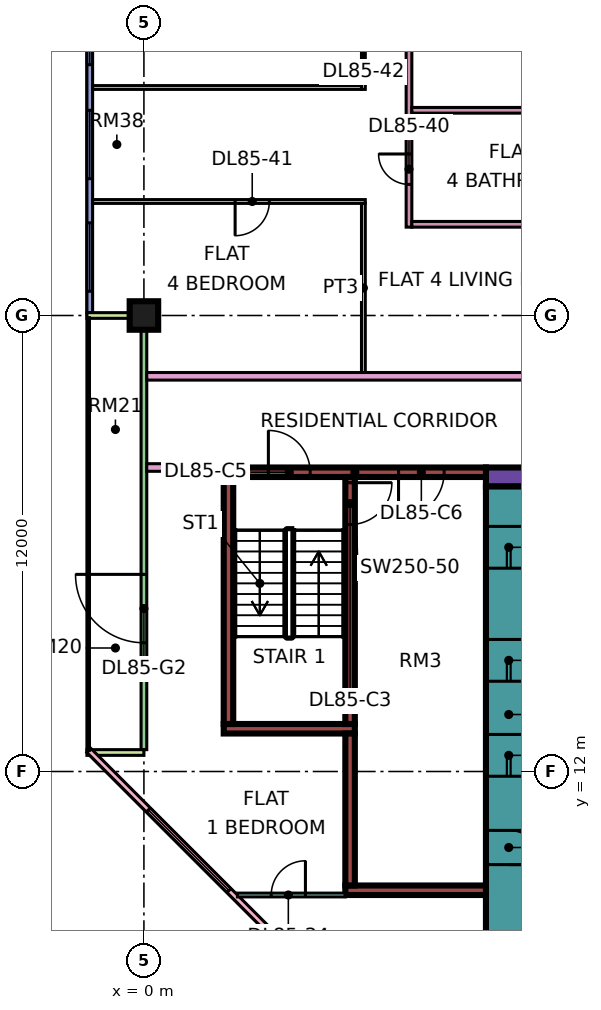
"""IFC4 building model, lengths in metres.
Left out: names, types, materials, properties, quantities, classifications, styles, units other than length and angle.
Written with IfcOpenShell. Run it as: python <this file> out.ifc"""

import sys

from ifc_helpers import new_model, si_unit, direction, frame, frame_2d, origin, origin_2d, place, context, subcontext, project, spatial, rectangle, extrude, element, fill, save


model = new_model("IFC4")
c1 = context("Model", 3, precision=1e-05, world=origin(), true_north=direction((0.0, 1.0)))
c2 = subcontext(c1, "Body", "Model", "MODEL_VIEW")
j1 = project(units=[si_unit("LENGTHUNIT", "METRE"), si_unit("PLANEANGLEUNIT", "RADIAN")], contexts=[c1])
p1 = place(None, origin())
s1 = spatial("IfcSite", under=j1, at=p1, CompositionType="ELEMENT")
p2 = place(p1, origin())
s2 = spatial("IfcBuilding", under=s1, at=p2, CompositionType="ELEMENT")
p3 = place(p2, frame((0.0, 0.0, 365.15)))
s3 = spatial("IfcBuildingStorey", under=s2, at=p3, CompositionType="ELEMENT", Elevation=365.15)
p4 = place(p3, frame((0.0, 24.0, 0.0), z_axis=(0.0, 0.0, 1.0), x_axis=(1.0, 0.0, 0.0)))
e1 = element("IfcColumn", 1, at=p4, inside=s3, PredefinedType="COLUMN", context=c2, shape_type="SweptSolid", body=[
    extrude(rectangle(XDim=0.75, YDim=0.75, at=origin_2d()), origin(), (0.0, 0.0, 1.0), 3.75),
])
p5 = place(p3, frame((9.0, 19.75, 0.0), z_axis=(0.0, 0.0, 1.0), x_axis=(1.0, 0.0, 0.0)))
e2 = element("IfcWall", 2, at=p5, inside=s3, PredefinedType="SHEAR", context=c2, shape_type="SweptSolid", body=[
    extrude(rectangle(XDim=25.0, YDim=0.5, at=frame_2d((12.5, 0.0))), origin(), (0.0, 0.0, 1.0), 3.75),
])
p6 = place(p5, frame((19.1, 0.0, 0.0)))
e3 = element("IfcOpeningElement", 3, at=p6, cuts=e2, PredefinedType="OPENING", context=c2, shape_type="SweptSolid", body=[
    extrude(rectangle(XDim=1.8, YDim=2.4, at=frame_2d((0.9, 1.2))), frame((0.0, 0.26, 0.0), z_axis=(0.0, -1.0, 0.0), x_axis=(1.0, 0.0, 0.0)), (0.0, 0.0, 1.0), 0.52),
])
p7 = place(p3, frame((9.6, 7.5, 0.0), z_axis=(0.0, 0.0, 1.0), x_axis=(0.0, 1.0, 0.0)))
e4 = element("IfcWall", 4, at=p7, inside=s3, PredefinedType="SHEAR", context=c2, shape_type="SweptSolid", body=[
    extrude(rectangle(XDim=12.0, YDim=1.2, at=frame_2d((6.0, 0.0))), origin(), (0.0, 0.0, 1.0), 3.75),
])
p8 = place(p7, frame((4.375, 0.0, 0.0)))
e5 = element("IfcOpeningElement", 5, at=p8, cuts=e4, PredefinedType="OPENING", context=c2, shape_type="SweptSolid", body=[
    extrude(rectangle(XDim=1.1, YDim=2.2, at=frame_2d((0.55, 1.1))), frame((0.0, 0.61, 0.0), z_axis=(0.0, -1.0, 0.0), x_axis=(1.0, 0.0, 0.0)), (0.0, 0.0, 1.0), 1.22),
])
p9 = place(p7, frame((6.875, 0.0, 0.0)))
e6 = element("IfcOpeningElement", 6, at=p9, cuts=e4, PredefinedType="OPENING", context=c2, shape_type="SweptSolid", body=[
    extrude(rectangle(XDim=1.1, YDim=2.2, at=frame_2d((0.55, 1.1))), frame((0.0, 0.61, 0.0), z_axis=(0.0, -1.0, 0.0), x_axis=(1.0, 0.0, 0.0)), (0.0, 0.0, 1.0), 1.22),
])
p10 = place(p7, frame((9.85, 0.0, 0.0)))
e7 = element("IfcOpeningElement", 7, at=p10, cuts=e4, PredefinedType="OPENING", context=c2, shape_type="SweptSolid", body=[
    extrude(rectangle(XDim=1.1, YDim=2.2, at=frame_2d((0.55, 1.1))), frame((0.0, 0.61, 0.0), z_axis=(0.0, -1.0, 0.0), x_axis=(1.0, 0.0, 0.0)), (0.0, 0.0, 1.0), 1.22),
])
p11 = place(p7, frame((2.05, 0.0, 0.0)))
e8 = element("IfcOpeningElement", 8, at=p11, cuts=e4, PredefinedType="OPENING", context=c2, shape_type="SweptSolid", body=[
    extrude(rectangle(XDim=0.9, YDim=2.1, at=frame_2d((0.45, 1.05))), frame((0.0, 0.61, 0.0), z_axis=(0.0, -1.0, 0.0), x_axis=(1.0, 0.0, 0.0)), (0.0, 0.0, 1.0), 1.22),
])
p12 = place(p3, frame((2.1, 19.875, 0.0), z_axis=(0.0, 0.0, 1.0), x_axis=(1.0, 0.0, 0.0)))
e9 = element("IfcWall", 9, at=p12, inside=s3, PredefinedType="SHEAR", context=c2, shape_type="SweptSolid", body=[
    extrude(rectangle(XDim=6.9, YDim=0.25, at=frame_2d((3.45, 0.0))), origin(), (0.0, 0.0, 1.0), 3.75),
])
p13 = place(p12, frame((1.175, 0.0, 0.0)))
e10 = element("IfcOpeningElement", 10, at=p13, cuts=e9, PredefinedType="OPENING", context=c2, shape_type="SweptSolid", body=[
    extrude(rectangle(XDim=1.1, YDim=2.2, at=frame_2d((0.55, 1.1))), frame((0.0, 0.135, 0.0), z_axis=(0.0, -1.0, 0.0), x_axis=(1.0, 0.0, 0.0)), (0.0, 0.0, 1.0), 0.27),
])
p14 = place(p12, frame((4.6, 0.0, 0.0)))
e11 = element("IfcOpeningElement", 11, at=p14, cuts=e9, PredefinedType="OPENING", context=c2, shape_type="SweptSolid", body=[
    extrude(rectangle(XDim=1.2, YDim=2.2, at=frame_2d((0.6, 1.1))), frame((0.0, 0.135, 0.0), z_axis=(0.0, -1.0, 0.0), x_axis=(1.0, 0.0, 0.0)), (0.0, 0.0, 1.0), 0.27),
])
p15 = place(p3, frame((2.1, 13.125, 0.0), z_axis=(0.0, 0.0, 1.0), x_axis=(1.0, 0.0, 0.0)))
e12 = element("IfcWall", 12, at=p15, inside=s3, PredefinedType="SHEAR", context=c2, shape_type="SweptSolid", body=[
    extrude(rectangle(XDim=3.45, YDim=0.25, at=frame_2d((1.725, 0.0))), origin(), (0.0, 0.0, 1.0), 3.75),
])
p16 = place(p3, frame((2.225, 13.25, 0.0), z_axis=(0.0, 0.0, 1.0), x_axis=(0.0, 1.0, 0.0)))
e13 = element("IfcWall", 13, at=p16, inside=s3, PredefinedType="SHEAR", context=c2, shape_type="SweptSolid", body=[
    extrude(rectangle(XDim=6.5, YDim=0.25, at=frame_2d((3.25, 0.0))), origin(), (0.0, 0.0, 1.0), 3.75),
])
p17 = place(p3, frame((5.425, 13.25, 0.0), z_axis=(0.0, 0.0, 1.0), x_axis=(0.0, 1.0, 0.0)))
e14 = element("IfcWall", 14, at=p17, inside=s3, PredefinedType="SHEAR", context=c2, shape_type="SweptSolid", body=[
    extrude(rectangle(XDim=6.5, YDim=0.25, at=frame_2d((3.25, 0.0))), origin(), (0.0, 0.0, 1.0), 3.75),
])
p18 = place(p17, frame((5.25, 0.0, 0.0)))
e15 = element("IfcOpeningElement", 15, at=p18, cuts=e14, PredefinedType="OPENING", context=c2, shape_type="SweptSolid", body=[
    extrude(rectangle(XDim=1.1, YDim=2.2, at=frame_2d((0.55, 1.1))), frame((0.0, 0.135, 0.0), z_axis=(0.0, -1.0, 0.0), x_axis=(1.0, 0.0, 0.0)), (0.0, 0.0, 1.0), 0.27),
])
p19 = place(p3, frame((5.3, 8.875, 0.0), z_axis=(0.0, 0.0, 1.0), x_axis=(1.0, 0.0, 0.0)))
e16 = element("IfcWall", 16, at=p19, inside=s3, PredefinedType="SHEAR", context=c2, shape_type="SweptSolid", body=[
    extrude(rectangle(XDim=3.7, YDim=0.25, at=frame_2d((1.85, 0.0))), origin(), (0.0, 0.0, 1.0), 3.75),
])
p20 = place(p3, frame((5.425, 9.0, 0.0), z_axis=(0.0, 0.0, 1.0), x_axis=(0.0, 1.0, 0.0)))
e17 = element("IfcWall", 17, at=p20, inside=s3, PredefinedType="SHEAR", context=c2, shape_type="SweptSolid", body=[
    extrude(rectangle(XDim=4.0, YDim=0.25, at=frame_2d((2.0, 0.0))), origin(), (0.0, 0.0, 1.0), 3.75),
])
p21 = place(p3, frame((-1.425, 35.925, 0.0), z_axis=(0.0, 0.0, 1.0), x_axis=(0.0, -1.0, 0.0)))
e18 = element("IfcWall", 18, at=p21, inside=s3, PredefinedType="SOLIDWALL", context=c2, shape_type="SweptSolid", body=[
    extrude(rectangle(XDim=11.85, YDim=0.15, at=frame_2d((5.925, 0.0))), origin(), (0.0, 0.0, 1.0), 3.35),
])
p22 = place(p21, frame((0.562, 0.0, 0.45)))
e19 = element("IfcOpeningElement", 19, at=p22, cuts=e18, PredefinedType="OPENING", context=c2, shape_type="SweptSolid", body=[
    extrude(rectangle(XDim=1.8, YDim=2.4, at=frame_2d((0.9, 1.2))), frame((0.0, 0.085, 0.0), z_axis=(0.0, -1.0, 0.0), x_axis=(1.0, 0.0, 0.0)), (0.0, 0.0, 1.0), 0.17),
])
p23 = place(p21, frame((3.525, 0.0, 0.45)))
e20 = element("IfcOpeningElement", 20, at=p23, cuts=e18, PredefinedType="OPENING", context=c2, shape_type="SweptSolid", body=[
    extrude(rectangle(XDim=1.8, YDim=2.4, at=frame_2d((0.9, 1.2))), frame((0.0, 0.085, 0.0), z_axis=(0.0, -1.0, 0.0), x_axis=(1.0, 0.0, 0.0)), (0.0, 0.0, 1.0), 0.17),
])
p24 = place(p21, frame((6.525, 0.0, 0.45)))
e21 = element("IfcOpeningElement", 21, at=p24, cuts=e18, PredefinedType="OPENING", context=c2, shape_type="SweptSolid", body=[
    extrude(rectangle(XDim=1.8, YDim=2.4, at=frame_2d((0.9, 1.2))), frame((0.0, 0.085, 0.0), z_axis=(0.0, -1.0, 0.0), x_axis=(1.0, 0.0, 0.0)), (0.0, 0.0, 1.0), 0.17),
])
p25 = place(p21, frame((9.488, 0.0, 0.45)))
e22 = element("IfcOpeningElement", 22, at=p25, cuts=e18, PredefinedType="OPENING", context=c2, shape_type="SweptSolid", body=[
    extrude(rectangle(XDim=1.8, YDim=2.4, at=frame_2d((0.9, 1.2))), frame((0.0, 0.085, 0.0), z_axis=(0.0, -1.0, 0.0), x_axis=(1.0, 0.0, 0.0)), (0.0, 0.0, 1.0), 0.17),
])
p26 = place(p3, frame((0.0, 23.925, 0.0), z_axis=(0.0, 0.0, 1.0), x_axis=(0.0, -1.0, 0.0)))
e23 = element("IfcWall", 23, at=p26, inside=s3, PredefinedType="SOLIDWALL", context=c2, shape_type="SweptSolid", body=[
    extrude(rectangle(XDim=11.35, YDim=0.15, at=frame_2d((5.675, 0.0))), origin(), (0.0, 0.0, 1.0), 3.35),
])
p27 = place(p26, frame((6.738, 0.0, 0.0)))
e24 = element("IfcOpeningElement", 24, at=p27, cuts=e23, PredefinedType="OPENING", context=c2, shape_type="SweptSolid", body=[
    extrude(rectangle(XDim=1.8, YDim=2.4, at=frame_2d((0.9, 1.2))), frame((0.0, 0.085, 0.0), z_axis=(0.0, -1.0, 0.0), x_axis=(1.0, 0.0, 0.0)), (0.0, 0.0, 1.0), 0.17),
])
for number, where, z_axis, x_axis in (
    (25, (-1.5, 24.0, 0.0), (0.0, 0.0, 1.0), (1.0, 0.0, 0.0)),
    (26, (-1.5, 12.5, 0.0), (0.0, 0.0, 1.0), (1.0, 0.0, 0.0)),
):
    element("IfcWall", number, at=place(p3, frame(where, z_axis=z_axis, x_axis=x_axis)), inside=s3, PredefinedType="SOLIDWALL", context=c2, shape_type="SweptSolid", body=[
        extrude(rectangle(XDim=1.5, YDim=0.15, at=frame_2d((0.75, 0.0))), origin(), (0.0, 0.0, 1.0), 3.35),
    ])
p28 = place(p3, frame((-1.447, 12.553, 0.0), z_axis=(0.0, 0.0, 1.0), x_axis=(0.707106781187, -0.707106781187, 0.0)))
e27 = element("IfcWall", 27, at=p28, inside=s3, PredefinedType="SOLIDWALL", context=c2, shape_type="SweptSolid", body=[
    extrude(rectangle(XDim=19.799, YDim=0.15, at=frame_2d((9.899, 0.0))), origin(), (0.0, 0.0, 1.0), 3.35),
])
p29 = place(p28, frame((2.212, 0.0, 0.45)))
e28 = element("IfcOpeningElement", 28, at=p29, cuts=e27, PredefinedType="OPENING", context=c2, shape_type="SweptSolid", body=[
    extrude(rectangle(XDim=3.0, YDim=2.4, at=frame_2d((1.5, 1.2))), frame((0.0, 0.085, 0.0), z_axis=(0.0, -1.0, 0.0), x_axis=(1.0, 0.0, 0.0)), (0.0, 0.0, 1.0), 0.17),
])
p30 = place(p28, frame((10.216, 0.0, 0.45)))
e29 = element("IfcOpeningElement", 29, at=p30, cuts=e27, PredefinedType="OPENING", context=c2, shape_type="SweptSolid", body=[
    extrude(rectangle(XDim=3.0, YDim=2.4, at=frame_2d((1.5, 1.2))), frame((0.0, 0.085, 0.0), z_axis=(0.0, -1.0, 0.0), x_axis=(1.0, 0.0, 0.0)), (0.0, 0.0, 1.0), 0.17),
])
p31 = place(p3, frame((-1.35, 27.0, 0.0), z_axis=(0.0, 0.0, 1.0), x_axis=(1.0, 0.0, 0.0)))
e30 = element("IfcWall", 30, at=p31, inside=s3, PredefinedType="PARTITIONING", context=c2, shape_type="SweptSolid", body=[
    extrude(rectangle(XDim=7.175, YDim=0.1, at=frame_2d((3.587, 0.0))), origin(), (0.0, 0.0, 1.0), 3.35),
])
p32 = place(p31, frame((3.75, 0.0, 0.0)))
e31 = element("IfcOpeningElement", 31, at=p32, cuts=e30, PredefinedType="OPENING", context=c2, shape_type="SweptSolid", body=[
    extrude(rectangle(XDim=0.9, YDim=2.1, at=frame_2d((0.45, 1.05))), frame((0.0, 0.06, 0.0), z_axis=(0.0, -1.0, 0.0), x_axis=(1.0, 0.0, 0.0)), (0.0, 0.0, 1.0), 0.12),
])
p33 = place(p3, frame((-1.35, 30.0, 0.0), z_axis=(0.0, 0.0, 1.0), x_axis=(1.0, 0.0, 0.0)))
e32 = element("IfcWall", 32, at=p33, inside=s3, PredefinedType="PARTITIONING", context=c2, shape_type="SweptSolid", body=[
    extrude(rectangle(XDim=7.075, YDim=0.1, at=frame_2d((3.538, 0.0))), origin(), (0.0, 0.0, 1.0), 3.35),
])
p34 = place(p3, frame((0.074, 20.0, 0.0), z_axis=(0.0, 0.0, 1.0), x_axis=(1.0, 0.0, 0.0)))
e33 = element("IfcWall", 33, at=p34, inside=s3, PredefinedType="PARTITIONING", context=c2, shape_type="SweptSolid", body=[
    extrude(rectangle(XDim=2.026, YDim=0.2, at=frame_2d((1.013, 0.0))), origin(), (0.0, 0.0, 1.0), 3.35),
])
p35 = place(p3, frame((0.074, 22.4, 0.0), z_axis=(0.0, 0.0, 1.0), x_axis=(1.0, 0.0, 0.0)))
e34 = element("IfcWall", 34, at=p35, inside=s3, PredefinedType="PARTITIONING", context=c2, shape_type="SweptSolid", body=[
    extrude(rectangle(XDim=12.201, YDim=0.2, at=frame_2d((6.101, 0.0))), origin(), (0.0, 0.0, 1.0), 3.35),
])
p36 = place(p3, frame((2.461, 8.75, 0.0), z_axis=(0.0, 0.0, 1.0), x_axis=(1.0, 0.0, 0.0)))
e35 = element("IfcWall", 35, at=p36, inside=s3, PredefinedType="PARTITIONING", context=c2, shape_type="SweptSolid", body=[
    extrude(rectangle(XDim=2.839, YDim=0.1, at=frame_2d((1.419, 0.0))), origin(), (0.0, 0.0, 1.0), 3.35),
])
p37 = place(p36, frame((0.889, 0.0, 0.0)))
e36 = element("IfcOpeningElement", 36, at=p37, cuts=e35, PredefinedType="OPENING", context=c2, shape_type="SweptSolid", body=[
    extrude(rectangle(XDim=0.9, YDim=2.1, at=frame_2d((0.45, 1.05))), frame((0.0, 0.06, 0.0), z_axis=(0.0, -1.0, 0.0), x_axis=(1.0, 0.0, 0.0)), (0.0, 0.0, 1.0), 0.12),
])
p38 = place(p3, frame((5.775, 22.5, 0.0), z_axis=(0.0, 0.0, 1.0), x_axis=(0.0, 1.0, 0.0)))
e37 = element("IfcWall", 37, at=p38, inside=s3, PredefinedType="PARTITIONING", context=c2, shape_type="SweptSolid", body=[
    extrude(rectangle(XDim=4.45, YDim=0.1, at=frame_2d((2.225, 0.0))), origin(), (0.0, 0.0, 1.0), 3.35),
])
p39 = place(p3, frame((5.775, 29.95, 0.0), z_axis=(0.0, 0.0, 1.0), x_axis=(0.0, 1.0, 0.0)))
e38 = element("IfcWall", 38, at=p39, inside=s3, PredefinedType="PARTITIONING", context=c2, shape_type="SweptSolid", body=[
    extrude(rectangle(XDim=5.95, YDim=0.1, at=frame_2d((2.975, 0.0))), origin(), (0.0, 0.0, 1.0), 3.35),
])
p40 = place(p39, frame((1.1, 0.0, 0.0)))
e39 = element("IfcOpeningElement", 39, at=p40, cuts=e38, PredefinedType="OPENING", context=c2, shape_type="SweptSolid", body=[
    extrude(rectangle(XDim=0.9, YDim=2.1, at=frame_2d((0.45, 1.05))), frame((0.0, 0.06, 0.0), z_axis=(0.0, -1.0, 0.0), x_axis=(1.0, 0.0, 0.0)), (0.0, 0.0, 1.0), 0.12),
])
p41 = place(p39, frame((4.1, 0.0, 0.0)))
e40 = element("IfcOpeningElement", 40, at=p41, cuts=e38, PredefinedType="OPENING", context=c2, shape_type="SweptSolid", body=[
    extrude(rectangle(XDim=0.9, YDim=2.1, at=frame_2d((0.45, 1.05))), frame((0.0, 0.06, 0.0), z_axis=(0.0, -1.0, 0.0), x_axis=(1.0, 0.0, 0.0)), (0.0, 0.0, 1.0), 0.12),
])
p42 = place(p3, frame((6.975, 26.325, 0.0), z_axis=(0.0, 0.0, 1.0), x_axis=(0.0, 1.0, 0.0)))
e41 = element("IfcWall", 41, at=p42, inside=s3, PredefinedType="PARTITIONING", context=c2, shape_type="SweptSolid", body=[
    extrude(rectangle(XDim=9.575, YDim=0.15, at=frame_2d((4.788, 0.0))), origin(), (0.0, 0.0, 1.0), 3.35),
])
p43 = place(p42, frame((1.125, 0.0, 0.0)))
e42 = element("IfcOpeningElement", 42, at=p43, cuts=e41, PredefinedType="OPENING", context=c2, shape_type="SweptSolid", body=[
    extrude(rectangle(XDim=0.8, YDim=2.1, at=frame_2d((0.4, 1.05))), frame((0.0, 0.085, 0.0), z_axis=(0.0, -1.0, 0.0), x_axis=(1.0, 0.0, 0.0)), (0.0, 0.0, 1.0), 0.17),
])
p44 = place(p42, frame((5.925, 0.0, 0.0)))
e43 = element("IfcOpeningElement", 43, at=p44, cuts=e41, PredefinedType="OPENING", context=c2, shape_type="SweptSolid", body=[
    extrude(rectangle(XDim=0.9, YDim=2.1, at=frame_2d((0.45, 1.05))), frame((0.0, 0.085, 0.0), z_axis=(0.0, -1.0, 0.0), x_axis=(1.0, 0.0, 0.0)), (0.0, 0.0, 1.0), 0.17),
])
for number, where, z_axis, x_axis in (
    (44, (7.05, 26.4, 0.0), (0.0, 0.0, 1.0), (1.0, 0.0, 0.0)),
    (45, (7.05, 29.4, 0.0), (0.0, 0.0, 1.0), (1.0, 0.0, 0.0)),
):
    element("IfcWall", number, at=place(p3, frame(where, z_axis=z_axis, x_axis=x_axis)), inside=s3, PredefinedType="PARTITIONING", context=c2, shape_type="SweptSolid", body=[
        extrude(rectangle(XDim=5.225, YDim=0.15, at=frame_2d((2.612, 0.0))), origin(), (0.0, 0.0, 1.0), 3.35),
    ])
p45 = place(p23, origin())
e46 = element("IfcWindow", 46, at=p45, inside=s3, PartitioningType="SINGLE_PANEL", PredefinedType="WINDOW", context=c2, shape_type="SweptSolid", body=[
    extrude(rectangle(XDim=1.8, YDim=2.4, at=frame_2d((0.9, 1.2))), frame((0.0, 0.03, 0.0), z_axis=(0.0, -1.0, 0.0), x_axis=(1.0, 0.0, 0.0)), (0.0, 0.0, 1.0), 0.06),
])
fill(e20, e46)
p46 = place(p24, origin())
e47 = element("IfcWindow", 47, at=p46, inside=s3, PartitioningType="SINGLE_PANEL", PredefinedType="WINDOW", context=c2, shape_type="SweptSolid", body=[
    extrude(rectangle(XDim=1.8, YDim=2.4, at=frame_2d((0.9, 1.2))), frame((0.0, 0.03, 0.0), z_axis=(0.0, -1.0, 0.0), x_axis=(1.0, 0.0, 0.0)), (0.0, 0.0, 1.0), 0.06),
])
fill(e21, e47)
p47 = place(p25, origin())
e48 = element("IfcWindow", 48, at=p47, inside=s3, PartitioningType="SINGLE_PANEL", PredefinedType="WINDOW", context=c2, shape_type="SweptSolid", body=[
    extrude(rectangle(XDim=1.8, YDim=2.4, at=frame_2d((0.9, 1.2))), frame((0.0, 0.03, 0.0), z_axis=(0.0, -1.0, 0.0), x_axis=(1.0, 0.0, 0.0)), (0.0, 0.0, 1.0), 0.06),
])
fill(e22, e48)
p48 = place(p27, frame((1.8, 0.0, 0.0), z_axis=(0.0, 0.0, 1.0), x_axis=(-1.0, 0.0, 0.0)))
e49 = element("IfcDoor", 49, at=p48, inside=s3, OperationType="DOUBLE_DOOR_SINGLE_SWING", PredefinedType="DOOR", context=c2, shape_type="SweptSolid", body=[
    extrude(rectangle(XDim=1.8, YDim=2.4, at=frame_2d((0.9, 1.2))), frame((0.0, 0.025, 0.0), z_axis=(0.0, -1.0, 0.0), x_axis=(1.0, 0.0, 0.0)), (0.0, 0.0, 1.0), 0.05),
])
fill(e24, e49)
p49 = place(p29, origin())
e50 = element("IfcWindow", 50, at=p49, inside=s3, PartitioningType="SINGLE_PANEL", PredefinedType="WINDOW", context=c2, shape_type="SweptSolid", body=[
    extrude(rectangle(XDim=3.0, YDim=2.4, at=frame_2d((1.5, 1.2))), frame((0.0, 0.03, 0.0), z_axis=(0.0, -1.0, 0.0), x_axis=(1.0, 0.0, 0.0)), (0.0, 0.0, 1.0), 0.06),
])
fill(e28, e50)
p50 = place(p8, origin())
e51 = element("IfcDoor", 51, at=p50, inside=s3, OperationType="DOUBLE_DOOR_SLIDING", PredefinedType="DOOR", context=c2, shape_type="SweptSolid", body=[
    extrude(rectangle(XDim=1.1, YDim=2.2, at=frame_2d((0.55, 1.1))), frame((0.0, 0.025, 0.0), z_axis=(0.0, -1.0, 0.0), x_axis=(1.0, 0.0, 0.0)), (0.0, 0.0, 1.0), 0.05),
])
fill(e5, e51)
p51 = place(p9, origin())
e52 = element("IfcDoor", 52, at=p51, inside=s3, OperationType="DOUBLE_DOOR_SLIDING", PredefinedType="DOOR", context=c2, shape_type="SweptSolid", body=[
    extrude(rectangle(XDim=1.1, YDim=2.2, at=frame_2d((0.55, 1.1))), frame((0.0, 0.025, 0.0), z_axis=(0.0, -1.0, 0.0), x_axis=(1.0, 0.0, 0.0)), (0.0, 0.0, 1.0), 0.05),
])
fill(e6, e52)
p52 = place(p10, origin())
e53 = element("IfcDoor", 53, at=p52, inside=s3, OperationType="DOUBLE_DOOR_SLIDING", PredefinedType="DOOR", context=c2, shape_type="SweptSolid", body=[
    extrude(rectangle(XDim=1.1, YDim=2.2, at=frame_2d((0.55, 1.1))), frame((0.0, 0.025, 0.0), z_axis=(0.0, -1.0, 0.0), x_axis=(1.0, 0.0, 0.0)), (0.0, 0.0, 1.0), 0.05),
])
fill(e7, e53)
p53 = place(p18, origin())
e54 = element("IfcDoor", 54, at=p53, inside=s3, OperationType="SINGLE_SWING_RIGHT", PredefinedType="DOOR", context=c2, shape_type="SweptSolid", body=[
    extrude(rectangle(XDim=1.1, YDim=2.2, at=frame_2d((0.55, 1.1))), frame((0.0, 0.025, 0.0), z_axis=(0.0, -1.0, 0.0), x_axis=(1.0, 0.0, 0.0)), (0.0, 0.0, 1.0), 0.05),
])
fill(e15, e54)
p54 = place(p11, frame((0.9, 0.0, 0.0), z_axis=(0.0, 0.0, 1.0), x_axis=(-1.0, 0.0, 0.0)))
e55 = element("IfcDoor", 55, at=p54, inside=s3, OperationType="SINGLE_SWING_LEFT", PredefinedType="DOOR", context=c2, shape_type="SweptSolid", body=[
    extrude(rectangle(XDim=0.9, YDim=2.1, at=frame_2d((0.45, 1.05))), frame((0.0, 0.025, 0.0), z_axis=(0.0, -1.0, 0.0), x_axis=(1.0, 0.0, 0.0)), (0.0, 0.0, 1.0), 0.05),
])
fill(e8, e55)
p55 = place(p13, origin())
e56 = element("IfcDoor", 56, at=p55, inside=s3, OperationType="SINGLE_SWING_LEFT", PredefinedType="DOOR", context=c2, shape_type="SweptSolid", body=[
    extrude(rectangle(XDim=1.1, YDim=2.2, at=frame_2d((0.55, 1.1))), frame((0.0, 0.025, 0.0), z_axis=(0.0, -1.0, 0.0), x_axis=(1.0, 0.0, 0.0)), (0.0, 0.0, 1.0), 0.05),
])
fill(e10, e56)
p56 = place(p14, frame((1.2, 0.0, 0.0), z_axis=(0.0, 0.0, 1.0), x_axis=(-1.0, 0.0, 0.0)))
e57 = element("IfcDoor", 57, at=p56, inside=s3, OperationType="SINGLE_SWING_LEFT", PredefinedType="DOOR", context=c2, shape_type="SweptSolid", body=[
    extrude(rectangle(XDim=1.2, YDim=2.2, at=frame_2d((0.6, 1.1))), frame((0.0, 0.025, 0.0), z_axis=(0.0, -1.0, 0.0), x_axis=(1.0, 0.0, 0.0)), (0.0, 0.0, 1.0), 0.05),
])
fill(e11, e57)
p57 = place(p37, frame((0.9, 0.0, 0.0), z_axis=(0.0, 0.0, 1.0), x_axis=(-1.0, 0.0, 0.0)))
e58 = element("IfcDoor", 58, at=p57, inside=s3, OperationType="SINGLE_SWING_RIGHT", PredefinedType="DOOR", context=c2, shape_type="SweptSolid", body=[
    extrude(rectangle(XDim=0.9, YDim=2.1, at=frame_2d((0.45, 1.05))), frame((0.0, 0.025, 0.0), z_axis=(0.0, -1.0, 0.0), x_axis=(1.0, 0.0, 0.0)), (0.0, 0.0, 1.0), 0.05),
])
fill(e36, e58)
p58 = place(p43, frame((0.8, 0.0, 0.0), z_axis=(0.0, 0.0, 1.0), x_axis=(-1.0, 0.0, 0.0)))
e59 = element("IfcDoor", 59, at=p58, inside=s3, OperationType="SINGLE_SWING_RIGHT", PredefinedType="DOOR", context=c2, shape_type="SweptSolid", body=[
    extrude(rectangle(XDim=0.8, YDim=2.1, at=frame_2d((0.4, 1.05))), frame((0.0, 0.025, 0.0), z_axis=(0.0, -1.0, 0.0), x_axis=(1.0, 0.0, 0.0)), (0.0, 0.0, 1.0), 0.05),
])
fill(e42, e59)
p59 = place(p32, frame((0.9, 0.0, 0.0), z_axis=(0.0, 0.0, 1.0), x_axis=(-1.0, 0.0, 0.0)))
e60 = element("IfcDoor", 60, at=p59, inside=s3, OperationType="SINGLE_SWING_LEFT", PredefinedType="DOOR", context=c2, shape_type="SweptSolid", body=[
    extrude(rectangle(XDim=0.9, YDim=2.1, at=frame_2d((0.45, 1.05))), frame((0.0, 0.025, 0.0), z_axis=(0.0, -1.0, 0.0), x_axis=(1.0, 0.0, 0.0)), (0.0, 0.0, 1.0), 0.05),
])
fill(e31, e60)
save(model, sys.argv[1])
